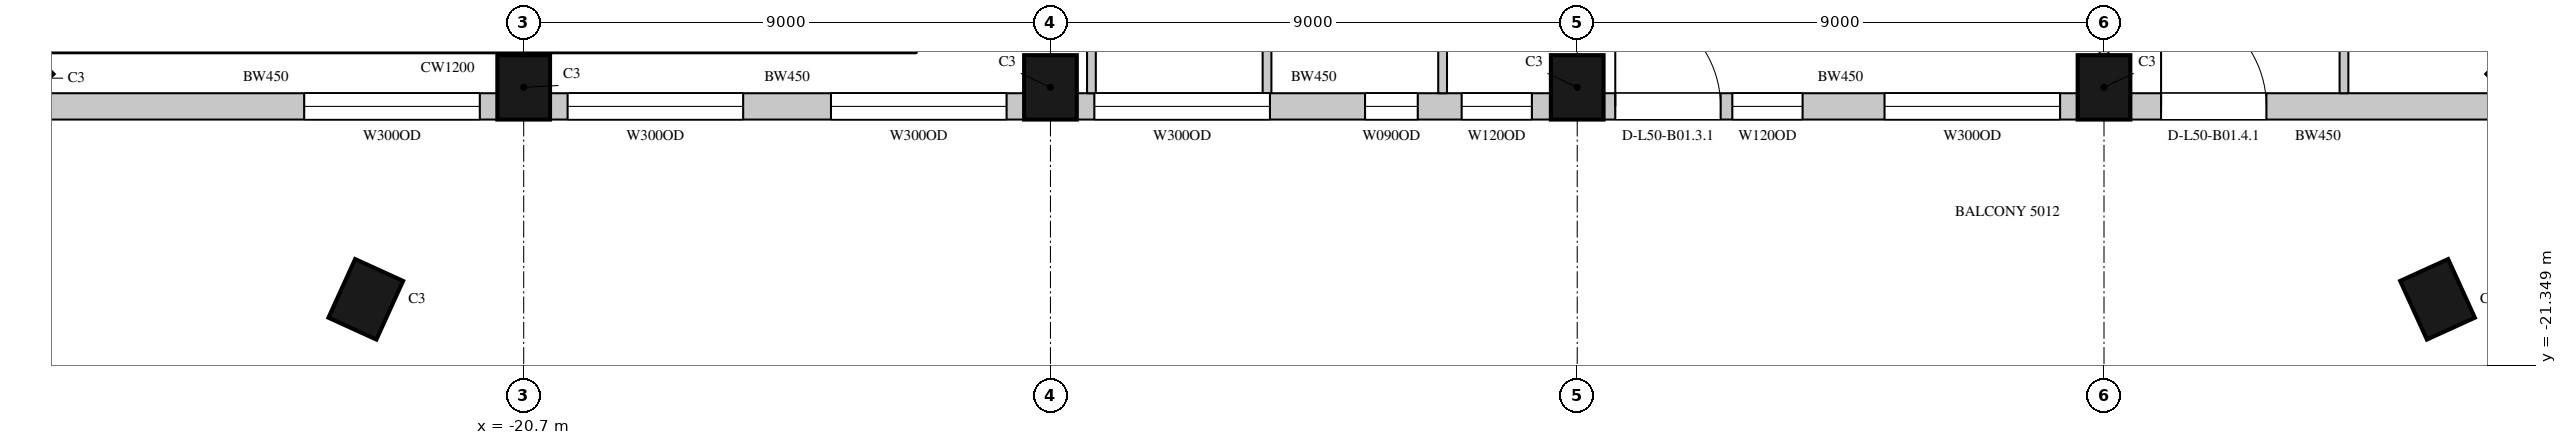
"""IFC4 building model, lengths in metres.
Left out: names, types, materials, properties, quantities, classifications, styles, units other than length and angle.
Written with IfcOpenShell. Run it as: python <this file> out.ifc"""

import sys

from ifc_helpers import new_model, si_unit, direction, frame, frame_2d, origin, origin_2d, place, context, subcontext, project, spatial, rectangle, extrude, element, fill, save


model = new_model("IFC4")
c1 = context("Model", 3, precision=1e-05, world=origin(), true_north=direction((0.0, 1.0)))
c2 = subcontext(c1, "Body", "Model", "MODEL_VIEW")
j1 = project(units=[si_unit("LENGTHUNIT", "METRE"), si_unit("PLANEANGLEUNIT", "RADIAN")], contexts=[c1])
p1 = place(None, origin())
s1 = spatial("IfcSite", under=j1, at=p1, CompositionType="ELEMENT")
p2 = place(p1, origin())
s2 = spatial("IfcBuilding", under=s1, at=p2, CompositionType="ELEMENT")
p3 = place(p2, frame((0.0, 0.0, 226.1)))
s3 = spatial("IfcBuildingStorey", under=s2, at=p3, CompositionType="ELEMENT", Elevation=226.1)
for number, where, z_axis, x_axis in (
    (1, (-29.443, -16.443, 0.0), (0.0, 0.0, 1.0), (0.707, -0.707, 0.0)),
    (2, (-20.7, -16.6, 0.0), (0.0, 0.0, 1.0), (1.0, 0.0, 0.0)),
    (3, (-11.7, -16.6, 0.0), (0.0, 0.0, 1.0), (1.0, 0.0, 0.0)),
    (4, (-2.7, -16.6, 0.0), (0.0, 0.0, 1.0), (1.0, 0.0, 0.0)),
    (5, (6.3, -16.6, 0.0), (0.0, 0.0, 1.0), (1.0, 0.0, 0.0)),
    (6, (13.543, -16.443, 0.0), (0.0, 0.0, 1.0), (0.707, 0.707, 0.0)),
    (7, (-23.398, -20.221, 0.0), (0.0, 0.0, 1.0), (0.91, -0.415, 0.0)),
    (8, (11.998, -20.221, 0.0), (0.0, 0.0, 1.0), (0.91, 0.415, 0.0)),
):
    element("IfcColumn", number, at=place(p3, frame(where, z_axis=z_axis, x_axis=x_axis)), inside=s3, PredefinedType="COLUMN", context=c2, shape_type="SweptSolid", body=[
        extrude(rectangle(XDim=0.9, YDim=1.1, at=origin_2d()), origin(), (0.0, 0.0, 1.0), 4.1),
    ])
p4 = place(p3, frame((-29.064, -16.925, 0.0), z_axis=(0.0, 0.0, 1.0), x_axis=(1.0, 0.0, 0.0)))
e9 = element("IfcWall", 9, at=p4, inside=s3, PredefinedType="SOLIDWALL", context=c2, shape_type="SweptSolid", body=[
    extrude(rectangle(XDim=7.914, YDim=0.45, at=frame_2d((3.957, 0.0))), origin(), (0.0, 0.0, 1.0), 3.8),
])
p5 = place(p4, frame((4.614, 0.0, 1.05)))
e10 = element("IfcOpeningElement", 10, at=p5, cuts=e9, PredefinedType="OPENING", context=c2, shape_type="SweptSolid", body=[
    extrude(rectangle(XDim=3.0, YDim=2.4, at=frame_2d((1.5, 1.2))), frame((0.0, 0.235, 0.0), z_axis=(0.0, -1.0, 0.0), x_axis=(1.0, 0.0, 0.0)), (0.0, 0.0, 1.0), 0.47),
])
p6 = place(p3, frame((-20.25, -16.925, 0.0), z_axis=(0.0, 0.0, 1.0), x_axis=(1.0, 0.0, 0.0)))
e11 = element("IfcWall", 11, at=p6, inside=s3, PredefinedType="SOLIDWALL", context=c2, shape_type="SweptSolid", body=[
    extrude(rectangle(XDim=8.1, YDim=0.45, at=frame_2d((4.05, 0.0))), origin(), (0.0, 0.0, 1.0), 3.8),
])
p7 = place(p6, frame((0.3, 0.0, 1.05)))
e12 = element("IfcOpeningElement", 12, at=p7, cuts=e11, PredefinedType="OPENING", context=c2, shape_type="SweptSolid", body=[
    extrude(rectangle(XDim=3.0, YDim=2.4, at=frame_2d((1.5, 1.2))), frame((0.0, 0.235, 0.0), z_axis=(0.0, -1.0, 0.0), x_axis=(1.0, 0.0, 0.0)), (0.0, 0.0, 1.0), 0.47),
])
p8 = place(p6, frame((4.8, 0.0, 1.05)))
e13 = element("IfcOpeningElement", 13, at=p8, cuts=e11, PredefinedType="OPENING", context=c2, shape_type="SweptSolid", body=[
    extrude(rectangle(XDim=3.0, YDim=2.4, at=frame_2d((1.5, 1.2))), frame((0.0, 0.235, 0.0), z_axis=(0.0, -1.0, 0.0), x_axis=(1.0, 0.0, 0.0)), (0.0, 0.0, 1.0), 0.47),
])
p9 = place(p3, frame((-11.25, -16.925, 0.0), z_axis=(0.0, 0.0, 1.0), x_axis=(1.0, 0.0, 0.0)))
e14 = element("IfcWall", 14, at=p9, inside=s3, PredefinedType="SOLIDWALL", context=c2, shape_type="SweptSolid", body=[
    extrude(rectangle(XDim=8.1, YDim=0.45, at=frame_2d((4.05, 0.0))), origin(), (0.0, 0.0, 1.0), 3.8),
])
p10 = place(p9, frame((0.3, 0.0, 1.05)))
e15 = element("IfcOpeningElement", 15, at=p10, cuts=e14, PredefinedType="OPENING", context=c2, shape_type="SweptSolid", body=[
    extrude(rectangle(XDim=3.0, YDim=2.4, at=frame_2d((1.5, 1.2))), frame((0.0, 0.235, 0.0), z_axis=(0.0, -1.0, 0.0), x_axis=(1.0, 0.0, 0.0)), (0.0, 0.0, 1.0), 0.47),
])
p11 = place(p9, frame((4.925, 0.0, 1.05)))
e16 = element("IfcOpeningElement", 16, at=p11, cuts=e14, PredefinedType="OPENING", context=c2, shape_type="SweptSolid", body=[
    extrude(rectangle(XDim=0.9, YDim=2.4, at=frame_2d((0.45, 1.2))), frame((0.0, 0.235, 0.0), z_axis=(0.0, -1.0, 0.0), x_axis=(1.0, 0.0, 0.0)), (0.0, 0.0, 1.0), 0.47),
])
p12 = place(p9, frame((6.575, 0.0, 1.05)))
e17 = element("IfcOpeningElement", 17, at=p12, cuts=e14, PredefinedType="OPENING", context=c2, shape_type="SweptSolid", body=[
    extrude(rectangle(XDim=1.2, YDim=2.4, at=frame_2d((0.6, 1.2))), frame((0.0, 0.235, 0.0), z_axis=(0.0, -1.0, 0.0), x_axis=(1.0, 0.0, 0.0)), (0.0, 0.0, 1.0), 0.47),
])
p13 = place(p3, frame((-2.25, -16.925, 0.0), z_axis=(0.0, 0.0, 1.0), x_axis=(1.0, 0.0, 0.0)))
e18 = element("IfcWall", 18, at=p13, inside=s3, PredefinedType="SOLIDWALL", context=c2, shape_type="SweptSolid", body=[
    extrude(rectangle(XDim=8.1, YDim=0.45, at=frame_2d((4.05, 0.0))), origin(), (0.0, 0.0, 1.0), 3.8),
])
p14 = place(p13, frame((0.2, 0.0, 0.0)))
e19 = element("IfcOpeningElement", 19, at=p14, cuts=e18, PredefinedType="OPENING", context=c2, shape_type="SweptSolid", body=[
    extrude(rectangle(XDim=1.8, YDim=2.4, at=frame_2d((0.9, 1.2))), frame((0.0, 0.235, 0.0), z_axis=(0.0, -1.0, 0.0), x_axis=(1.0, 0.0, 0.0)), (0.0, 0.0, 1.0), 0.47),
])
p15 = place(p13, frame((2.2, 0.0, 1.05)))
e20 = element("IfcOpeningElement", 20, at=p15, cuts=e18, PredefinedType="OPENING", context=c2, shape_type="SweptSolid", body=[
    extrude(rectangle(XDim=1.2, YDim=2.4, at=frame_2d((0.6, 1.2))), frame((0.0, 0.235, 0.0), z_axis=(0.0, -1.0, 0.0), x_axis=(1.0, 0.0, 0.0)), (0.0, 0.0, 1.0), 0.47),
])
p16 = place(p13, frame((4.8, 0.0, 1.05)))
e21 = element("IfcOpeningElement", 21, at=p16, cuts=e18, PredefinedType="OPENING", context=c2, shape_type="SweptSolid", body=[
    extrude(rectangle(XDim=3.0, YDim=2.4, at=frame_2d((1.5, 1.2))), frame((0.0, 0.235, 0.0), z_axis=(0.0, -1.0, 0.0), x_axis=(1.0, 0.0, 0.0)), (0.0, 0.0, 1.0), 0.47),
])
p17 = place(p3, frame((6.75, -16.925, 0.0), z_axis=(0.0, 0.0, 1.0), x_axis=(1.0, 0.0, 0.0)))
e22 = element("IfcWall", 22, at=p17, inside=s3, PredefinedType="SOLIDWALL", context=c2, shape_type="SweptSolid", body=[
    extrude(rectangle(XDim=6.414, YDim=0.45, at=frame_2d((3.207, 0.0))), origin(), (0.0, 0.0, 1.0), 3.8),
])
p18 = place(p17, frame((0.525, 0.0, 0.0)))
e23 = element("IfcOpeningElement", 23, at=p18, cuts=e22, PredefinedType="OPENING", context=c2, shape_type="SweptSolid", body=[
    extrude(rectangle(XDim=1.8, YDim=2.4, at=frame_2d((0.9, 1.2))), frame((0.0, 0.235, 0.0), z_axis=(0.0, -1.0, 0.0), x_axis=(1.0, 0.0, 0.0)), (0.0, 0.0, 1.0), 0.47),
])
for number, where, z_axis, x_axis in (
    (24, (-19.73, -18.0, 0.0), (0.0, 0.0, 1.0), (1.0, 0.0, 0.0)),
    (25, (-15.77, -18.0, 0.0), (0.0, 0.0, 1.0), (1.0, 0.0, 0.0)),
    (26, (-11.81, -18.0, 0.0), (0.0, 0.0, 1.0), (1.0, 0.0, 0.0)),
    (27, (0.07, -18.0, 0.0), (0.0, 0.0, 1.0), (1.0, 0.0, 0.0)),
):
    element("IfcWall", number, at=place(p3, frame(where, z_axis=z_axis, x_axis=x_axis)), inside=s3, PredefinedType="SOLIDWALL", context=c2, shape_type="SweptSolid", body=[
        extrude(rectangle(XDim=3.76, YDim=0.45, at=frame_2d((1.88, 0.0))), origin(), (0.0, 0.0, 1.0), 0.6),
    ])
p19 = place(p3, frame((4.03, -18.0, 0.0), z_axis=(0.0, 0.0, 1.0), x_axis=(1.0, 0.0, 0.0)))
e28 = element("IfcWall", 28, at=p19, inside=s3, PredefinedType="SOLIDWALL", context=c2, shape_type="SweptSolid", body=[
    extrude(rectangle(XDim=2.945, YDim=0.45, at=frame_2d((1.473, 0.0))), origin(), (0.0, 0.0, 1.0), 0.6),
])
p20 = place(p3, frame((-11.0, -16.7, 0.0), z_axis=(0.0, 0.0, 1.0), x_axis=(0.0, 1.0, 0.0)))
e29 = element("IfcWall", 29, at=p20, inside=s3, PredefinedType="PARTITIONING", context=c2, shape_type="SweptSolid", body=[
    extrude(rectangle(XDim=1.88, YDim=0.15, at=frame_2d((0.94, 0.0))), origin(), (0.0, 0.0, 1.0), 3.8),
])
for number, where, z_axis, x_axis in (
    (30, (-8.0, -16.7, 0.0), (0.0, 0.0, 1.0), (0.0, 1.0, 0.0)),
    (31, (-5.0, -16.7, 0.0), (0.0, 0.0, 1.0), (0.0, 1.0, 0.0)),
):
    element("IfcWall", number, at=place(p3, frame(where, z_axis=z_axis, x_axis=x_axis)), inside=s3, PredefinedType="PARTITIONING", context=c2, shape_type="SweptSolid", body=[
        extrude(rectangle(XDim=5.2, YDim=0.15, at=frame_2d((2.6, 0.0))), origin(), (0.0, 0.0, 1.0), 3.8),
    ])
p21 = place(p3, frame((6.3, -16.05, 0.0), z_axis=(0.0, 0.0, 1.0), x_axis=(0.0, 1.0, 0.0)))
e32 = element("IfcWall", 32, at=p21, inside=s3, PredefinedType="PARTITIONING", context=c2, shape_type="SweptSolid", body=[
    extrude(rectangle(XDim=4.55, YDim=0.15, at=frame_2d((2.275, 0.0))), origin(), (0.0, 0.0, 1.0), 3.25),
])
p22 = place(p3, frame((10.4, -16.7, 0.0), z_axis=(0.0, 0.0, 1.0), x_axis=(0.0, 1.0, 0.0)))
e33 = element("IfcWall", 33, at=p22, inside=s3, PredefinedType="PARTITIONING", context=c2, shape_type="SweptSolid", body=[
    extrude(rectangle(XDim=5.3, YDim=0.15, at=frame_2d((2.65, 0.0))), origin(), (0.0, 0.0, 1.0), 3.8),
])
p23 = place(p5, origin())
e34 = element("IfcWindow", 34, at=p23, inside=s3, PartitioningType="SINGLE_PANEL", PredefinedType="WINDOW", context=c2, shape_type="SweptSolid", body=[
    extrude(rectangle(XDim=3.0, YDim=2.4, at=frame_2d((1.5, 1.2))), frame((0.0, 0.135, 0.0), z_axis=(0.0, -1.0, 0.0), x_axis=(1.0, 0.0, 0.0)), (0.0, 0.0, 1.0), 0.06),
])
fill(e10, e34)
p24 = place(p7, origin())
e35 = element("IfcWindow", 35, at=p24, inside=s3, PartitioningType="SINGLE_PANEL", PredefinedType="WINDOW", context=c2, shape_type="SweptSolid", body=[
    extrude(rectangle(XDim=3.0, YDim=2.4, at=frame_2d((1.5, 1.2))), frame((0.0, 0.135, 0.0), z_axis=(0.0, -1.0, 0.0), x_axis=(1.0, 0.0, 0.0)), (0.0, 0.0, 1.0), 0.06),
])
fill(e12, e35)
p25 = place(p8, origin())
e36 = element("IfcWindow", 36, at=p25, inside=s3, PartitioningType="SINGLE_PANEL", PredefinedType="WINDOW", context=c2, shape_type="SweptSolid", body=[
    extrude(rectangle(XDim=3.0, YDim=2.4, at=frame_2d((1.5, 1.2))), frame((0.0, 0.135, 0.0), z_axis=(0.0, -1.0, 0.0), x_axis=(1.0, 0.0, 0.0)), (0.0, 0.0, 1.0), 0.06),
])
fill(e13, e36)
p26 = place(p10, origin())
e37 = element("IfcWindow", 37, at=p26, inside=s3, PartitioningType="SINGLE_PANEL", PredefinedType="WINDOW", context=c2, shape_type="SweptSolid", body=[
    extrude(rectangle(XDim=3.0, YDim=2.4, at=frame_2d((1.5, 1.2))), frame((0.0, 0.135, 0.0), z_axis=(0.0, -1.0, 0.0), x_axis=(1.0, 0.0, 0.0)), (0.0, 0.0, 1.0), 0.06),
])
fill(e15, e37)
p27 = place(p14, origin())
e38 = element("IfcDoor", 38, at=p27, inside=s3, OperationType="SLIDING_TO_LEFT", PredefinedType="DOOR", context=c2, shape_type="SweptSolid", body=[
    extrude(rectangle(XDim=1.8, YDim=2.4, at=frame_2d((0.9, 1.2))), frame((0.0, 0.13, 0.0), z_axis=(0.0, -1.0, 0.0), x_axis=(1.0, 0.0, 0.0)), (0.0, 0.0, 1.0), 0.05),
])
fill(e19, e38)
p28 = place(p15, origin())
e39 = element("IfcWindow", 39, at=p28, inside=s3, PartitioningType="SINGLE_PANEL", PredefinedType="WINDOW", context=c2, shape_type="SweptSolid", body=[
    extrude(rectangle(XDim=1.2, YDim=2.4, at=frame_2d((0.6, 1.2))), frame((0.0, 0.135, 0.0), z_axis=(0.0, -1.0, 0.0), x_axis=(1.0, 0.0, 0.0)), (0.0, 0.0, 1.0), 0.06),
])
fill(e20, e39)
p29 = place(p16, origin())
e40 = element("IfcWindow", 40, at=p29, inside=s3, PartitioningType="SINGLE_PANEL", PredefinedType="WINDOW", context=c2, shape_type="SweptSolid", body=[
    extrude(rectangle(XDim=3.0, YDim=2.4, at=frame_2d((1.5, 1.2))), frame((0.0, 0.135, 0.0), z_axis=(0.0, -1.0, 0.0), x_axis=(1.0, 0.0, 0.0)), (0.0, 0.0, 1.0), 0.06),
])
fill(e21, e40)
p30 = place(p18, origin())
e41 = element("IfcDoor", 41, at=p30, inside=s3, OperationType="SLIDING_TO_LEFT", PredefinedType="DOOR", context=c2, shape_type="SweptSolid", body=[
    extrude(rectangle(XDim=1.8, YDim=2.4, at=frame_2d((0.9, 1.2))), frame((0.0, 0.13, 0.0), z_axis=(0.0, -1.0, 0.0), x_axis=(1.0, 0.0, 0.0)), (0.0, 0.0, 1.0), 0.05),
])
fill(e23, e41)
p31 = place(p11, origin())
e42 = element("IfcWindow", 42, at=p31, inside=s3, PartitioningType="SINGLE_PANEL", PredefinedType="WINDOW", context=c2, shape_type="SweptSolid", body=[
    extrude(rectangle(XDim=0.9, YDim=2.4, at=frame_2d((0.45, 1.2))), frame((0.0, 0.135, 0.0), z_axis=(0.0, -1.0, 0.0), x_axis=(1.0, 0.0, 0.0)), (0.0, 0.0, 1.0), 0.06),
])
fill(e16, e42)
p32 = place(p12, origin())
e43 = element("IfcWindow", 43, at=p32, inside=s3, PartitioningType="SINGLE_PANEL", PredefinedType="WINDOW", context=c2, shape_type="SweptSolid", body=[
    extrude(rectangle(XDim=1.2, YDim=2.4, at=frame_2d((0.6, 1.2))), frame((0.0, 0.135, 0.0), z_axis=(0.0, -1.0, 0.0), x_axis=(1.0, 0.0, 0.0)), (0.0, 0.0, 1.0), 0.06),
])
fill(e17, e43)
save(model, sys.argv[1])
